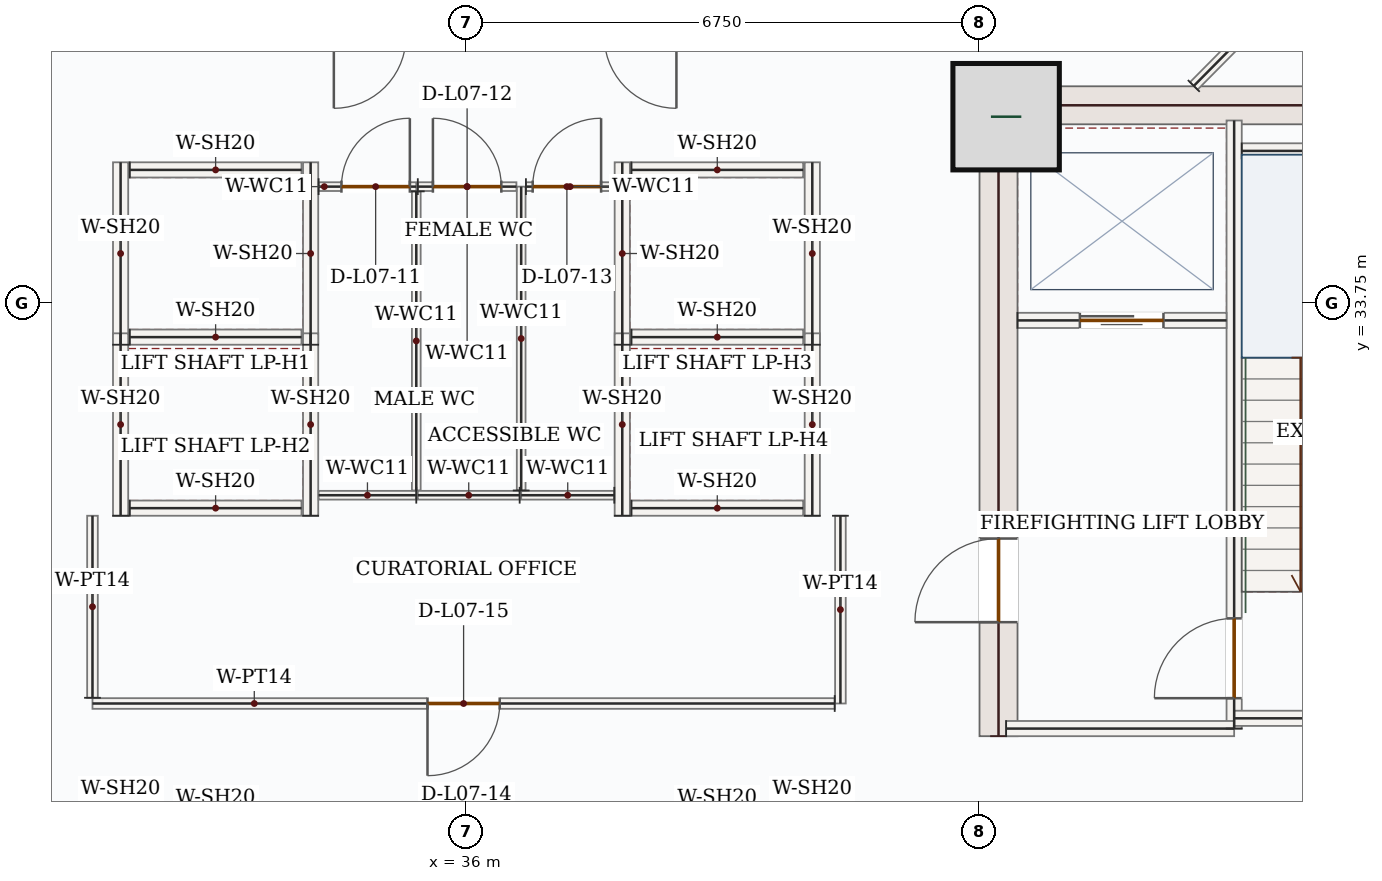
"""IFC4 building model, lengths in metres.
Left out: names, types, materials, properties, quantities, classifications, styles, units other than length and angle.
Written with IfcOpenShell. Run it as: python <this file> out.ifc"""

import sys

from ifc_helpers import new_model, si_unit, direction, frame, frame_2d, origin, origin_2d, place, context, subcontext, project, spatial, rectangle, extrude, source, transform, mapped, element, fill, save


model = new_model("IFC4")
c1 = context("Model", 3, precision=1e-05, world=origin(), true_north=direction((0.0, 1.0)))
c2 = subcontext(c1, "Body", "Model", "MODEL_VIEW")
j1 = project(units=[si_unit("LENGTHUNIT", "METRE"), si_unit("PLANEANGLEUNIT", "RADIAN")], contexts=[c1])
p1 = place(None, origin())
s1 = spatial("IfcSite", under=j1, at=p1, CompositionType="ELEMENT")
p2 = place(p1, origin())
s2 = spatial("IfcBuilding", under=s1, at=p2, CompositionType="ELEMENT")
p3 = place(p2, frame((0.0, 0.0, 37.5)))
s3 = spatial("IfcBuildingStorey", under=s2, at=p3, CompositionType="ELEMENT", Elevation=37.5)
p4 = place(p3, frame((43.0, 28.05, 0.0), z_axis=(0.0, 0.0, 1.0), x_axis=(0.0, 1.0, 0.0)))
e1 = element("IfcWall", 1, at=p4, inside=s3, PredefinedType="SHEAR", context=c2, shape_type="SweptSolid", body=[
    extrude(rectangle(XDim=8.55, YDim=0.5, at=frame_2d((4.275, 0.0))), origin(), (0.0, 0.0, 1.0), 3.95),
])
p5 = place(p4, frame((1.5, 0.0, 0.0)))
e2 = element("IfcOpeningElement", 2, at=p5, cuts=e1, PredefinedType="OPENING", context=c2, shape_type="SweptSolid", body=[
    extrude(rectangle(XDim=1.1, YDim=2.2, at=frame_2d((0.55, 1.1))), frame((0.0, 0.26, 0.0), z_axis=(0.0, -1.0, 0.0), x_axis=(1.0, 0.0, 0.0)), (0.0, 0.0, 1.0), 0.52),
])
m1 = source(origin(), c2, "Body", "SweptSolid", [
    extrude(rectangle(XDim=7.0, YDim=0.5, at=frame_2d((3.5, 0.0))), origin(), (0.0, 0.0, 1.0), 3.95),
])
p6 = place(p3, frame((43.25, 36.35, 0.0), z_axis=(0.0, 0.0, 1.0), x_axis=(1.0, 0.0, 0.0)))
e3 = element("IfcWall", 3, at=p6, inside=s3, PredefinedType="SHEAR", context=c2, shape_type="MappedRepresentation", body=[
    mapped(m1, transform((0.0, 0.0, 0.0), x_axis=(1.0, 0.0, 0.0), y_axis=(0.0, 1.0, 0.0), z_axis=(0.0, 0.0, 1.0), scale=1.0)),
])
m2 = source(origin(), c2, "Body", "SweptSolid", [
    extrude(rectangle(XDim=1.4, YDim=1.4, at=origin_2d()), origin(), (0.0, 0.0, 1.0), 4.2),
])
p7 = place(p3, frame((43.1, 36.2, 0.0), z_axis=(0.0, 0.0, 1.0), x_axis=(1.0, 0.0, 0.0)))
e4 = element("IfcColumn", 4, at=p7, inside=s3, PredefinedType="COLUMN", context=c2, shape_type="MappedRepresentation", body=[
    mapped(m2, transform((0.0, 0.0, 0.0), x_axis=(1.0, 0.0, 0.0), y_axis=(0.0, 1.0, 0.0), z_axis=(0.0, 0.0, 1.0), scale=1.0)),
])
p8 = place(p3, frame((46.1, 28.15, 0.0), z_axis=(0.0, 0.0, 1.0), x_axis=(0.0, 1.0, 0.0)))
e5 = element("IfcWall", 5, at=p8, inside=s3, PredefinedType="SOLIDWALL", context=c2, shape_type="SweptSolid", body=[
    extrude(rectangle(XDim=8.0, YDim=0.2, at=frame_2d((4.0, 0.0))), origin(), (0.0, 0.0, 1.0), 3.95),
])
p9 = place(p8, frame((0.4, 0.0, 0.0)))
e6 = element("IfcOpeningElement", 6, at=p9, cuts=e5, PredefinedType="OPENING", context=c2, shape_type="SweptSolid", body=[
    extrude(rectangle(XDim=1.05, YDim=2.15, at=frame_2d((0.525, 1.075))), frame((0.0, 0.11, 0.0), z_axis=(0.0, -1.0, 0.0), x_axis=(1.0, 0.0, 0.0)), (0.0, 0.0, 1.0), 0.22),
])
m3 = source(origin(), c2, "Body", "SweptSolid", [
    extrude(rectangle(XDim=3.0, YDim=0.2, at=frame_2d((1.5, 0.0))), origin(), (0.0, 0.0, 1.0), 3.95),
])
p10 = place(p3, frame((43.1, 28.15, 0.0), z_axis=(0.0, 0.0, 1.0), x_axis=(1.0, 0.0, 0.0)))
e7 = element("IfcWall", 7, at=p10, inside=s3, PredefinedType="SOLIDWALL", context=c2, shape_type="MappedRepresentation", body=[
    mapped(m3, transform((0.0, 0.0, 0.0), x_axis=(1.0, 0.0, 0.0), y_axis=(0.0, 1.0, 0.0), z_axis=(0.0, 0.0, 1.0), scale=1.0)),
])
m4 = source(origin(), c2, "Body", "SweptSolid", [
    extrude(rectangle(XDim=4.25, YDim=0.2, at=frame_2d((2.125, 0.0))), origin(), (0.0, 0.0, 1.0), 3.95),
])
p11 = place(p3, frame((46.1, 28.285, 0.0), z_axis=(0.0, 0.0, 1.0), x_axis=(1.0, 0.0, 0.0)))
e8 = element("IfcWall", 8, at=p11, inside=s3, PredefinedType="SOLIDWALL", context=c2, shape_type="MappedRepresentation", body=[
    mapped(m4, transform((0.0, 0.0, 0.0), x_axis=(1.0, 0.0, 0.0), y_axis=(0.0, 1.0, 0.0), z_axis=(0.0, 0.0, 1.0), scale=1.0)),
])
m5 = source(origin(), c2, "Body", "SweptSolid", [
    extrude(rectangle(XDim=3.25, YDim=0.2, at=frame_2d((1.625, 0.0))), origin(), (0.0, 0.0, 1.0), 3.95),
])
p12 = place(p3, frame((46.2, 35.75, 0.0), z_axis=(0.0, 0.0, 1.0), x_axis=(1.0, 0.0, 0.0)))
e9 = element("IfcWall", 9, at=p12, inside=s3, PredefinedType="SOLIDWALL", context=c2, shape_type="MappedRepresentation", body=[
    mapped(m5, transform((0.0, 0.0, 0.0), x_axis=(1.0, 0.0, 0.0), y_axis=(0.0, 1.0, 0.0), z_axis=(0.0, 0.0, 1.0), scale=1.0)),
])
p13 = place(p3, frame((43.25, 33.52, 0.0), z_axis=(0.0, 0.0, 1.0), x_axis=(1.0, 0.0, 0.0)))
e10 = element("IfcWall", 10, at=p13, inside=s3, PredefinedType="SOLIDWALL", context=c2, shape_type="SweptSolid", body=[
    extrude(rectangle(XDim=2.75, YDim=0.2, at=frame_2d((1.375, 0.0))), origin(), (0.0, 0.0, 1.0), 3.95),
])
p14 = place(p13, frame((0.82, 0.0, 0.0)))
e11 = element("IfcOpeningElement", 11, at=p14, cuts=e10, PredefinedType="OPENING", context=c2, shape_type="SweptSolid", body=[
    extrude(rectangle(XDim=1.1, YDim=2.15, at=frame_2d((0.55, 1.075))), frame((0.0, 0.11, 0.0), z_axis=(0.0, -1.0, 0.0), x_axis=(1.0, 0.0, 0.0)), (0.0, 0.0, 1.0), 0.22),
])
m6 = source(origin(), c2, "Body", "SweptSolid", [
    extrude(rectangle(XDim=2.4, YDim=0.2, at=frame_2d((1.2, 0.0))), origin(), (0.0, 0.0, 1.0), 3.95),
])
for number, where, z_axis, x_axis in (
    (12, (31.45, 33.2, 0.0), (0.0, 0.0, 1.0), (0.0, 1.0, 0.0)),
    (13, (33.95, 33.2, 0.0), (0.0, 0.0, 1.0), (0.0, 1.0, 0.0)),
):
    element("IfcWall", number, at=place(p3, frame(where, z_axis=z_axis, x_axis=x_axis)), inside=s3, PredefinedType="SOLIDWALL", context=c2, shape_type="MappedRepresentation", body=[
        mapped(m6, transform((0.0, 0.0, 0.0), x_axis=(1.0, 0.0, 0.0), y_axis=(0.0, 1.0, 0.0), z_axis=(0.0, 0.0, 1.0), scale=1.0)),
    ])
m7 = source(origin(), c2, "Body", "SweptSolid", [
    extrude(rectangle(XDim=2.26, YDim=0.2, at=frame_2d((1.13, 0.0))), origin(), (0.0, 0.0, 1.0), 3.95),
])
for number, where, z_axis, x_axis in (
    (14, (31.57, 33.3, 0.0), (0.0, 0.0, 1.0), (1.0, 0.0, 0.0)),
    (15, (31.57, 35.5, 0.0), (0.0, 0.0, 1.0), (1.0, 0.0, 0.0)),
):
    element("IfcWall", number, at=place(p3, frame(where, z_axis=z_axis, x_axis=x_axis)), inside=s3, PredefinedType="SOLIDWALL", context=c2, shape_type="MappedRepresentation", body=[
        mapped(m7, transform((0.0, 0.0, 0.0), x_axis=(1.0, 0.0, 0.0), y_axis=(0.0, 1.0, 0.0), z_axis=(0.0, 0.0, 1.0), scale=1.0)),
    ])
for number, where, z_axis, x_axis in (
    (16, (31.45, 30.95, 0.0), (0.0, 0.0, 1.0), (0.0, 1.0, 0.0)),
    (17, (33.95, 30.95, 0.0), (0.0, 0.0, 1.0), (0.0, 1.0, 0.0)),
):
    element("IfcWall", number, at=place(p3, frame(where, z_axis=z_axis, x_axis=x_axis)), inside=s3, PredefinedType="SOLIDWALL", context=c2, shape_type="MappedRepresentation", body=[
        mapped(m6, transform((0.0, 0.0, 0.0), x_axis=(1.0, 0.0, 0.0), y_axis=(0.0, 1.0, 0.0), z_axis=(0.0, 0.0, 1.0), scale=1.0)),
    ])
p15 = place(p3, frame((31.57, 31.05, 0.0), z_axis=(0.0, 0.0, 1.0), x_axis=(1.0, 0.0, 0.0)))
e18 = element("IfcWall", 18, at=p15, inside=s3, PredefinedType="SOLIDWALL", context=c2, shape_type="MappedRepresentation", body=[
    mapped(m7, transform((0.0, 0.0, 0.0), x_axis=(1.0, 0.0, 0.0), y_axis=(0.0, 1.0, 0.0), z_axis=(0.0, 0.0, 1.0), scale=1.0)),
])
for number, where, z_axis, x_axis in (
    (19, (38.05, 33.2, 0.0), (0.0, 0.0, 1.0), (0.0, 1.0, 0.0)),
    (20, (40.55, 33.2, 0.0), (0.0, 0.0, 1.0), (0.0, 1.0, 0.0)),
):
    element("IfcWall", number, at=place(p3, frame(where, z_axis=z_axis, x_axis=x_axis)), inside=s3, PredefinedType="SOLIDWALL", context=c2, shape_type="MappedRepresentation", body=[
        mapped(m6, transform((0.0, 0.0, 0.0), x_axis=(1.0, 0.0, 0.0), y_axis=(0.0, 1.0, 0.0), z_axis=(0.0, 0.0, 1.0), scale=1.0)),
    ])
for number, where, z_axis, x_axis in (
    (21, (38.17, 33.3, 0.0), (0.0, 0.0, 1.0), (1.0, 0.0, 0.0)),
    (22, (38.17, 35.5, 0.0), (0.0, 0.0, 1.0), (1.0, 0.0, 0.0)),
):
    element("IfcWall", number, at=place(p3, frame(where, z_axis=z_axis, x_axis=x_axis)), inside=s3, PredefinedType="SOLIDWALL", context=c2, shape_type="MappedRepresentation", body=[
        mapped(m7, transform((0.0, 0.0, 0.0), x_axis=(1.0, 0.0, 0.0), y_axis=(0.0, 1.0, 0.0), z_axis=(0.0, 0.0, 1.0), scale=1.0)),
    ])
for number, where, z_axis, x_axis in (
    (23, (38.05, 30.95, 0.0), (0.0, 0.0, 1.0), (0.0, 1.0, 0.0)),
    (24, (40.55, 30.95, 0.0), (0.0, 0.0, 1.0), (0.0, 1.0, 0.0)),
):
    element("IfcWall", number, at=place(p3, frame(where, z_axis=z_axis, x_axis=x_axis)), inside=s3, PredefinedType="SOLIDWALL", context=c2, shape_type="MappedRepresentation", body=[
        mapped(m6, transform((0.0, 0.0, 0.0), x_axis=(1.0, 0.0, 0.0), y_axis=(0.0, 1.0, 0.0), z_axis=(0.0, 0.0, 1.0), scale=1.0)),
    ])
p16 = place(p3, frame((38.17, 31.05, 0.0), z_axis=(0.0, 0.0, 1.0), x_axis=(1.0, 0.0, 0.0)))
e25 = element("IfcWall", 25, at=p16, inside=s3, PredefinedType="SOLIDWALL", context=c2, shape_type="MappedRepresentation", body=[
    mapped(m7, transform((0.0, 0.0, 0.0), x_axis=(1.0, 0.0, 0.0), y_axis=(0.0, 1.0, 0.0), z_axis=(0.0, 0.0, 1.0), scale=1.0)),
])
m8 = source(origin(), c2, "Body", "SweptSolid", [
    extrude(rectangle(XDim=1.225, YDim=0.115, at=frame_2d((0.613, 0.0))), origin(), (0.0, 0.0, 1.0), 3.95),
])
p17 = place(p3, frame((37.945, 31.22, 0.0), z_axis=(0.0, 0.0, 1.0), x_axis=(-1.0, 0.0, 0.0)))
e26 = element("IfcWall", 26, at=p17, inside=s3, PredefinedType="PARTITIONING", context=c2, shape_type="MappedRepresentation", body=[
    mapped(m8, transform((0.0, 0.0, 0.0), x_axis=(1.0, 0.0, 0.0), y_axis=(0.0, 1.0, 0.0), z_axis=(0.0, 0.0, 1.0), scale=1.0)),
])
m9 = source(origin(), c2, "Body", "SweptSolid", [
    extrude(rectangle(XDim=3.998, YDim=0.115, at=frame_2d((1.999, 0.0))), origin(), (0.0, 0.0, 1.0), 3.95),
])
p18 = place(p3, frame((36.72, 31.282, 0.0), z_axis=(0.0, 0.0, 1.0), x_axis=(0.0, 1.0, 0.0)))
e27 = element("IfcWall", 27, at=p18, inside=s3, PredefinedType="PARTITIONING", context=c2, shape_type="MappedRepresentation", body=[
    mapped(m9, transform((0.0, 0.0, 0.0), x_axis=(1.0, 0.0, 0.0), y_axis=(0.0, 1.0, 0.0), z_axis=(0.0, 0.0, 1.0), scale=1.0)),
])
p19 = place(p3, frame((36.782, 35.28, 0.0), z_axis=(0.0, 0.0, 1.0), x_axis=(1.0, 0.0, 0.0)))
e28 = element("IfcWall", 28, at=p19, inside=s3, PredefinedType="PARTITIONING", context=c2, shape_type="SweptSolid", body=[
    extrude(rectangle(XDim=1.163, YDim=0.115, at=frame_2d((0.581, 0.0))), origin(), (0.0, 0.0, 1.0), 3.95),
])
p20 = place(p19, frame((0.089, 0.0, 0.0)))
e29 = element("IfcOpeningElement", 29, at=p20, cuts=e28, PredefinedType="OPENING", context=c2, shape_type="SweptSolid", body=[
    extrude(rectangle(XDim=0.9, YDim=2.1, at=frame_2d((0.45, 1.05))), frame((0.0, 0.067, 0.0), z_axis=(0.0, -1.0, 0.0), x_axis=(1.0, 0.0, 0.0)), (0.0, 0.0, 1.0), 0.135),
])
m10 = source(origin(), c2, "Body", "SweptSolid", [
    extrude(rectangle(XDim=1.285, YDim=0.115, at=frame_2d((0.643, 0.0))), origin(), (0.0, 0.0, 1.0), 3.95),
])
p21 = place(p3, frame((35.34, 31.22, 0.0), z_axis=(0.0, 0.0, 1.0), x_axis=(-1.0, 0.0, 0.0)))
e30 = element("IfcWall", 30, at=p21, inside=s3, PredefinedType="PARTITIONING", context=c2, shape_type="MappedRepresentation", body=[
    mapped(m10, transform((0.0, 0.0, 0.0), x_axis=(1.0, 0.0, 0.0), y_axis=(0.0, 1.0, 0.0), z_axis=(0.0, 0.0, 1.0), scale=1.0)),
])
p22 = place(p3, frame((34.055, 35.28, 0.0), z_axis=(0.0, 0.0, 1.0), x_axis=(1.0, 0.0, 0.0)))
e31 = element("IfcWall", 31, at=p22, inside=s3, PredefinedType="PARTITIONING", context=c2, shape_type="SweptSolid", body=[
    extrude(rectangle(XDim=1.285, YDim=0.115, at=frame_2d((0.643, 0.0))), origin(), (0.0, 0.0, 1.0), 3.95),
])
p23 = place(p22, frame((0.3, 0.0, 0.0)))
e32 = element("IfcOpeningElement", 32, at=p23, cuts=e31, PredefinedType="OPENING", context=c2, shape_type="SweptSolid", body=[
    extrude(rectangle(XDim=0.9, YDim=2.1, at=frame_2d((0.45, 1.05))), frame((0.0, 0.067, 0.0), z_axis=(0.0, -1.0, 0.0), x_axis=(1.0, 0.0, 0.0)), (0.0, 0.0, 1.0), 0.135),
])
m11 = source(origin(), c2, "Body", "SweptSolid", [
    extrude(rectangle(XDim=3.935, YDim=0.115, at=frame_2d((1.968, 0.0))), origin(), (0.0, 0.0, 1.0), 3.95),
])
p24 = place(p3, frame((35.34, 35.218, 0.0), z_axis=(0.0, 0.0, 1.0), x_axis=(0.0, -1.0, 0.0)))
e33 = element("IfcWall", 33, at=p24, inside=s3, PredefinedType="PARTITIONING", context=c2, shape_type="MappedRepresentation", body=[
    mapped(m11, transform((0.0, 0.0, 0.0), x_axis=(1.0, 0.0, 0.0), y_axis=(0.0, 1.0, 0.0), z_axis=(0.0, 0.0, 1.0), scale=1.0)),
])
m12 = source(origin(), c2, "Body", "SweptSolid", [
    extrude(rectangle(XDim=1.34, YDim=0.115, at=frame_2d((0.67, 0.0))), origin(), (0.0, 0.0, 1.0), 3.95),
])
p25 = place(p3, frame((36.7, 31.22, 0.0), z_axis=(0.0, 0.0, 1.0), x_axis=(-1.0, 0.0, 0.0)))
e34 = element("IfcWall", 34, at=p25, inside=s3, PredefinedType="PARTITIONING", context=c2, shape_type="MappedRepresentation", body=[
    mapped(m12, transform((0.0, 0.0, 0.0), x_axis=(1.0, 0.0, 0.0), y_axis=(0.0, 1.0, 0.0), z_axis=(0.0, 0.0, 1.0), scale=1.0)),
])
p26 = place(p3, frame((35.36, 35.28, 0.0), z_axis=(0.0, 0.0, 1.0), x_axis=(1.0, 0.0, 0.0)))
e35 = element("IfcWall", 35, at=p26, inside=s3, PredefinedType="PARTITIONING", context=c2, shape_type="SweptSolid", body=[
    extrude(rectangle(XDim=1.297, YDim=0.115, at=frame_2d((0.649, 0.0))), origin(), (0.0, 0.0, 1.0), 3.95),
])
p27 = place(p26, frame((0.199, 0.0, 0.0)))
e36 = element("IfcOpeningElement", 36, at=p27, cuts=e35, PredefinedType="OPENING", context=c2, shape_type="SweptSolid", body=[
    extrude(rectangle(XDim=0.9, YDim=2.1, at=frame_2d((0.45, 1.05))), frame((0.0, 0.067, 0.0), z_axis=(0.0, -1.0, 0.0), x_axis=(1.0, 0.0, 0.0)), (0.0, 0.0, 1.0), 0.135),
])
m13 = source(origin(), c2, "Body", "SweptSolid", [
    extrude(rectangle(XDim=2.47, YDim=0.14, at=frame_2d((1.235, 0.0))), origin(), (0.0, 0.0, 1.0), 3.95),
])
p28 = place(p3, frame((40.92, 30.95, 0.0), z_axis=(0.0, 0.0, 1.0), x_axis=(0.0, -1.0, 0.0)))
e37 = element("IfcWall", 37, at=p28, inside=s3, PredefinedType="PARTITIONING", context=c2, shape_type="MappedRepresentation", body=[
    mapped(m13, transform((0.0, 0.0, 0.0), x_axis=(1.0, 0.0, 0.0), y_axis=(0.0, 1.0, 0.0), z_axis=(0.0, 0.0, 1.0), scale=1.0)),
])
p29 = place(p3, frame((40.845, 28.48, 0.0), z_axis=(0.0, 0.0, 1.0), x_axis=(-1.0, 0.0, 0.0)))
e38 = element("IfcWall", 38, at=p29, inside=s3, PredefinedType="PARTITIONING", context=c2, shape_type="SweptSolid", body=[
    extrude(rectangle(XDim=9.765, YDim=0.14, at=frame_2d((4.882, 0.0))), origin(), (0.0, 0.0, 1.0), 3.95),
])
p30 = place(p29, frame((4.407, 0.0, 0.0)))
e39 = element("IfcOpeningElement", 39, at=p30, cuts=e38, PredefinedType="OPENING", context=c2, shape_type="SweptSolid", body=[
    extrude(rectangle(XDim=0.95, YDim=2.15, at=frame_2d((0.475, 1.075))), frame((0.0, 0.08, 0.0), z_axis=(0.0, -1.0, 0.0), x_axis=(1.0, 0.0, 0.0)), (0.0, 0.0, 1.0), 0.16),
])
m14 = source(origin(), c2, "Body", "SweptSolid", [
    extrude(rectangle(XDim=2.395, YDim=0.14, at=frame_2d((1.198, 0.0))), origin(), (0.0, 0.0, 1.0), 3.95),
])
p31 = place(p3, frame((31.08, 28.555, 0.0), z_axis=(0.0, 0.0, 1.0), x_axis=(0.0, 1.0, 0.0)))
e40 = element("IfcWall", 40, at=p31, inside=s3, PredefinedType="PARTITIONING", context=c2, shape_type="MappedRepresentation", body=[
    mapped(m14, transform((0.0, 0.0, 0.0), x_axis=(1.0, 0.0, 0.0), y_axis=(0.0, 1.0, 0.0), z_axis=(0.0, 0.0, 1.0), scale=1.0)),
])
m15 = source(origin(), c2, "Body", "SweptSolid", [
    extrude(rectangle(XDim=3.505, YDim=0.14, at=frame_2d((1.752, 0.0))), origin(), (0.0, 0.0, 1.0), 3.95),
])
p32 = place(p3, frame((45.569, 36.605, 0.0), z_axis=(0.0, 0.0, 1.0), x_axis=(0.703790445361, 0.710407635811, 0.0)))
e41 = element("IfcWall", 41, at=p32, inside=s3, PredefinedType="PARTITIONING", context=c2, shape_type="MappedRepresentation", body=[
    mapped(m15, transform((0.0, 0.0, 0.0), x_axis=(1.0, 0.0, 0.0), y_axis=(0.0, 1.0, 0.0), z_axis=(0.0, 0.0, 1.0), scale=1.0)),
])
m16 = source(origin(), c2, "Body", "SweptSolid", [
    extrude(rectangle(XDim=1.05, YDim=2.15, at=frame_2d((0.525, 1.075))), frame((0.0, 0.025, 0.0), z_axis=(0.0, -1.0, 0.0), x_axis=(1.0, 0.0, 0.0)), (0.0, 0.0, 1.0), 0.05),
])
p33 = place(p9, origin())
e42 = element("IfcDoor", 42, at=p33, inside=s3, OperationType="SINGLE_SWING_LEFT", PredefinedType="DOOR", context=c2, shape_type="MappedRepresentation", body=[
    mapped(m16, transform((0.0, 0.0, 0.0), x_axis=(1.0, 0.0, 0.0), y_axis=(0.0, 1.0, 0.0), z_axis=(0.0, 0.0, 1.0), scale=1.0)),
])
fill(e6, e42)
m17 = source(origin(), c2, "Body", "SweptSolid", [
    extrude(rectangle(XDim=1.1, YDim=2.15, at=frame_2d((0.55, 1.075))), frame((0.0, 0.025, 0.0), z_axis=(0.0, -1.0, 0.0), x_axis=(1.0, 0.0, 0.0)), (0.0, 0.0, 1.0), 0.05),
])
p34 = place(p14, origin())
e43 = element("IfcDoor", 43, at=p34, inside=s3, OperationType="DOUBLE_DOOR_SLIDING", PredefinedType="DOOR", context=c2, shape_type="MappedRepresentation", body=[
    mapped(m17, transform((0.0, 0.0, 0.0), x_axis=(1.0, 0.0, 0.0), y_axis=(0.0, 1.0, 0.0), z_axis=(0.0, 0.0, 1.0), scale=1.0)),
])
fill(e11, e43)
m18 = source(origin(), c2, "Body", "SweptSolid", [
    extrude(rectangle(XDim=1.1, YDim=2.2, at=frame_2d((0.55, 1.1))), frame((0.0, 0.025, 0.0), z_axis=(0.0, -1.0, 0.0), x_axis=(1.0, 0.0, 0.0)), (0.0, 0.0, 1.0), 0.05),
])
p35 = place(p5, origin())
e44 = element("IfcDoor", 44, at=p35, inside=s3, OperationType="SINGLE_SWING_LEFT", PredefinedType="DOOR", context=c2, shape_type="MappedRepresentation", body=[
    mapped(m18, transform((0.0, 0.0, 0.0), x_axis=(1.0, 0.0, 0.0), y_axis=(0.0, 1.0, 0.0), z_axis=(0.0, 0.0, 1.0), scale=1.0)),
])
fill(e2, e44)
m19 = source(origin(), c2, "Body", "SweptSolid", [
    extrude(rectangle(XDim=0.9, YDim=2.1, at=frame_2d((0.45, 1.05))), frame((0.0, 0.025, 0.0), z_axis=(0.0, -1.0, 0.0), x_axis=(1.0, 0.0, 0.0)), (0.0, 0.0, 1.0), 0.05),
])
p36 = place(p23, origin())
e45 = element("IfcDoor", 45, at=p36, inside=s3, OperationType="SINGLE_SWING_RIGHT", PredefinedType="DOOR", context=c2, shape_type="MappedRepresentation", body=[
    mapped(m19, transform((0.0, 0.0, 0.0), x_axis=(1.0, 0.0, 0.0), y_axis=(0.0, 1.0, 0.0), z_axis=(0.0, 0.0, 1.0), scale=1.0)),
])
fill(e32, e45)
p37 = place(p27, origin())
e46 = element("IfcDoor", 46, at=p37, inside=s3, OperationType="SINGLE_SWING_LEFT", PredefinedType="DOOR", context=c2, shape_type="MappedRepresentation", body=[
    mapped(m19, transform((0.0, 0.0, 0.0), x_axis=(1.0, 0.0, 0.0), y_axis=(0.0, 1.0, 0.0), z_axis=(0.0, 0.0, 1.0), scale=1.0)),
])
fill(e36, e46)
p38 = place(p20, origin())
e47 = element("IfcDoor", 47, at=p38, inside=s3, OperationType="SINGLE_SWING_RIGHT", PredefinedType="DOOR", context=c2, shape_type="MappedRepresentation", body=[
    mapped(m19, transform((0.0, 0.0, 0.0), x_axis=(1.0, 0.0, 0.0), y_axis=(0.0, 1.0, 0.0), z_axis=(0.0, 0.0, 1.0), scale=1.0)),
])
fill(e29, e47)
m20 = source(origin(), c2, "Body", "SweptSolid", [
    extrude(rectangle(XDim=0.95, YDim=2.15, at=frame_2d((0.475, 1.075))), frame((0.0, 0.025, 0.0), z_axis=(0.0, -1.0, 0.0), x_axis=(1.0, 0.0, 0.0)), (0.0, 0.0, 1.0), 0.05),
])
p39 = place(p30, origin())
e48 = element("IfcDoor", 48, at=p39, inside=s3, OperationType="SINGLE_SWING_RIGHT", PredefinedType="DOOR", context=c2, shape_type="MappedRepresentation", body=[
    mapped(m20, transform((0.0, 0.0, 0.0), x_axis=(1.0, 0.0, 0.0), y_axis=(0.0, 1.0, 0.0), z_axis=(0.0, 0.0, 1.0), scale=1.0)),
])
fill(e39, e48)
save(model, sys.argv[1])
